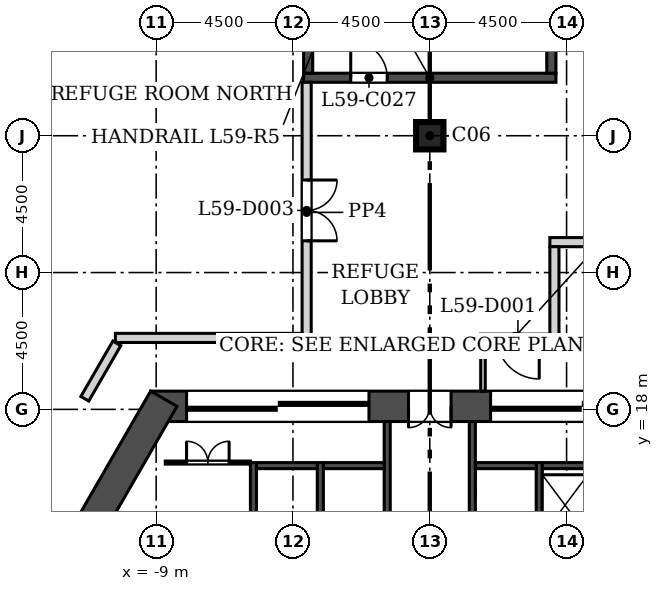
"""IFC4 building model, lengths in metres.
Left out: names, types, materials, properties, quantities, classifications, styles, units other than length and angle.
Written with IfcOpenShell. Run it as: python <this file> out.ifc"""

import sys

from ifc_helpers import new_model, si_unit, direction, frame, frame_2d, origin, origin_2d, place, context, subcontext, project, spatial, rectangle, extrude, element, fill, save


model = new_model("IFC4")
c1 = context("Model", 3, precision=1e-05, world=origin(), true_north=direction((0.0, 1.0)))
c2 = subcontext(c1, "Body", "Model", "MODEL_VIEW")
j1 = project(units=[si_unit("LENGTHUNIT", "METRE"), si_unit("PLANEANGLEUNIT", "RADIAN")], contexts=[c1])
p1 = place(None, origin())
s1 = spatial("IfcSite", under=j1, at=p1, CompositionType="ELEMENT")
p2 = place(p1, origin())
s2 = spatial("IfcBuilding", under=s1, at=p2, CompositionType="ELEMENT")
p3 = place(p2, frame((0.0, 0.0, 259.5)))
s3 = spatial("IfcBuildingStorey", under=s2, at=p3, CompositionType="ELEMENT", Elevation=259.5)
p4 = place(p3, frame((0.0, 27.0, 0.0), z_axis=(0.0, 0.0, 1.0), x_axis=(1.0, 0.0, 0.0)))
e1 = element("IfcColumn", 1, at=p4, inside=s3, PredefinedType="COLUMN", context=c2, shape_type="SweptSolid", body=[
    extrude(rectangle(XDim=0.9, YDim=0.9, at=origin_2d()), origin(), (0.0, 0.0, 1.0), 7.2),
])
p5 = place(p3, frame((9.181, 18.1, 0.0), z_axis=(0.0, 0.0, 1.0), x_axis=(-1.0, 0.0, 0.0)))
e2 = element("IfcWall", 2, at=p5, inside=s3, PredefinedType="SHEAR", context=c2, shape_type="SweptSolid", body=[
    extrude(rectangle(XDim=18.361, YDim=1.0, at=frame_2d((9.181, 0.0))), origin(), (0.0, 0.0, 1.0), 7.2),
])
p6 = place(p5, frame((8.481, 0.0, 0.0)))
e3 = element("IfcOpeningElement", 3, at=p6, cuts=e2, PredefinedType="OPENING", context=c2, shape_type="SweptSolid", body=[
    extrude(rectangle(XDim=1.4, YDim=2.1, at=frame_2d((0.7, 1.05))), frame((0.0, 0.51, 0.0), z_axis=(0.0, -1.0, 0.0), x_axis=(1.0, 0.0, 0.0)), (0.0, 0.0, 1.0), 1.02),
])
p7 = place(p5, frame((11.181, 0.0, 0.0)))
e4 = element("IfcOpeningElement", 4, at=p7, cuts=e2, PredefinedType="OPENING", context=c2, shape_type="SweptSolid", body=[
    extrude(rectangle(XDim=6.0, YDim=2.4, at=frame_2d((3.0, 1.2))), frame((0.0, 0.51, 0.0), z_axis=(0.0, -1.0, 0.0), x_axis=(1.0, 0.0, 0.0)), (0.0, 0.0, 1.0), 1.02),
])
p8 = place(p5, frame((1.181, 0.0, 0.0)))
e5 = element("IfcOpeningElement", 5, at=p8, cuts=e2, PredefinedType="OPENING", context=c2, shape_type="SweptSolid", body=[
    extrude(rectangle(XDim=6.0, YDim=2.4, at=frame_2d((3.0, 1.2))), frame((0.0, 0.51, 0.0), z_axis=(0.0, -1.0, 0.0), x_axis=(1.0, 0.0, 0.0)), (0.0, 0.0, 1.0), 1.02),
])
p9 = place(p3, frame((-8.748, 18.35, 0.0), z_axis=(0.0, 0.0, 1.0), x_axis=(-0.499995021168, -0.866028278295, 0.0)))
e6 = element("IfcWall", 6, at=p9, inside=s3, PredefinedType="SHEAR", context=c2, shape_type="SweptSolid", body=[
    extrude(rectangle(XDim=8.839, YDim=1.0, at=frame_2d((4.419, 0.0))), origin(), (0.0, 0.0, 1.0), 7.2),
])
p10 = place(p3, frame((26.022, 7.709, 0.0), z_axis=(0.0, 0.0, 1.0), x_axis=(-0.500000891752, 0.866024888931, 0.0)))
e7 = element("IfcWall", 7, at=p10, inside=s3, PredefinedType="SOLIDWALL", context=c2, shape_type="SweptSolid", body=[
    extrude(rectangle(XDim=43.339, YDim=0.34, at=frame_2d((21.669, 0.0))), origin(), (0.0, 0.0, 1.0), 6.8),
])
p11 = place(p10, frame((19.335, 0.0, 0.9)))
e8 = element("IfcOpeningElement", 8, at=p11, cuts=e7, PredefinedType="OPENING", context=c2, shape_type="SweptSolid", body=[
    extrude(rectangle(XDim=1.885, YDim=3.0, at=frame_2d((0.942, 1.5))), frame((0.0, 0.18, 0.0), z_axis=(0.0, -1.0, 0.0), x_axis=(1.0, 0.0, 0.0)), (0.0, 0.0, 1.0), 0.36),
])
p12 = place(p10, frame((34.335, 0.0, 0.9)))
e9 = element("IfcOpeningElement", 9, at=p12, cuts=e7, PredefinedType="OPENING", context=c2, shape_type="SweptSolid", body=[
    extrude(rectangle(XDim=1.885, YDim=3.0, at=frame_2d((0.942, 1.5))), frame((0.0, 0.18, 0.0), z_axis=(0.0, -1.0, 0.0), x_axis=(1.0, 0.0, 0.0)), (0.0, 0.0, 1.0), 0.36),
])
p13 = place(p10, frame((40.335, 0.0, 0.9)))
e10 = element("IfcOpeningElement", 10, at=p13, cuts=e7, PredefinedType="OPENING", context=c2, shape_type="SweptSolid", body=[
    extrude(rectangle(XDim=1.885, YDim=3.0, at=frame_2d((0.942, 1.5))), frame((0.0, 0.18, 0.0), z_axis=(0.0, -1.0, 0.0), x_axis=(1.0, 0.0, 0.0)), (0.0, 0.0, 1.0), 0.36),
])
p14 = place(p3, frame((-4.353, 45.242, 0.0), z_axis=(0.0, 0.0, 1.0), x_axis=(-0.500000891752, -0.866024888931, 0.0)))
e11 = element("IfcWall", 11, at=p14, inside=s3, PredefinedType="SOLIDWALL", context=c2, shape_type="SweptSolid", body=[
    extrude(rectangle(XDim=43.339, YDim=0.34, at=frame_2d((21.669, 0.0))), origin(), (0.0, 0.0, 1.0), 6.8),
])
p15 = place(p3, frame((-5.8, 8.25, -0.4), z_axis=(0.0, 0.0, 1.0), x_axis=(0.0, 1.0, 0.0)))
e12 = element("IfcWall", 12, at=p15, inside=s3, PredefinedType="SOLIDWALL", context=c2, shape_type="SweptSolid", body=[
    extrude(rectangle(XDim=8.0, YDim=0.2, at=frame_2d((4.0, 0.0))), origin(), (0.0, 0.0, 1.0), 7.2),
])
p16 = place(p15, frame((0.9, 0.0, 0.4)))
e13 = element("IfcOpeningElement", 13, at=p16, cuts=e12, PredefinedType="OPENING", context=c2, shape_type="SweptSolid", body=[
    extrude(rectangle(XDim=1.0, YDim=2.1, at=frame_2d((0.5, 1.05))), frame((0.0, 0.11, 0.0), z_axis=(0.0, -1.0, 0.0), x_axis=(1.0, 0.0, 0.0)), (0.0, 0.0, 1.0), 0.22),
])
p17 = place(p15, frame((4.8, 0.0, 0.4)))
e14 = element("IfcOpeningElement", 14, at=p17, cuts=e12, PredefinedType="OPENING", context=c2, shape_type="SweptSolid", body=[
    extrude(rectangle(XDim=1.0, YDim=2.1, at=frame_2d((0.5, 1.05))), frame((0.0, 0.11, 0.0), z_axis=(0.0, -1.0, 0.0), x_axis=(1.0, 0.0, 0.0)), (0.0, 0.0, 1.0), 0.22),
])
for number, where, z_axis, x_axis in (
    (15, (-3.6, 8.45, -0.4), (0.0, 0.0, 1.0), (0.0, 1.0, 0.0)),
    (16, (3.6, 8.45, -0.4), (0.0, 0.0, 1.0), (0.0, 1.0, 0.0)),
):
    element("IfcWall", number, at=place(p3, frame(where, z_axis=z_axis, x_axis=x_axis)), inside=s3, PredefinedType="SOLIDWALL", context=c2, shape_type="SweptSolid", body=[
        extrude(rectangle(XDim=7.8, YDim=0.2, at=frame_2d((3.9, 0.0))), origin(), (0.0, 0.0, 1.0), 7.2),
    ])
p18 = place(p3, frame((-1.4, 5.85, -0.4), z_axis=(0.0, 0.0, 1.0), x_axis=(0.0, 1.0, 0.0)))
e17 = element("IfcWall", 17, at=p18, inside=s3, PredefinedType="SOLIDWALL", context=c2, shape_type="SweptSolid", body=[
    extrude(rectangle(XDim=11.75, YDim=0.2, at=frame_2d((5.875, 0.0))), origin(), (0.0, 0.0, 1.0), 7.2),
])
p19 = place(p18, frame((0.65, 0.0, 0.4)))
e18 = element("IfcOpeningElement", 18, at=p19, cuts=e17, PredefinedType="OPENING", context=c2, shape_type="SweptSolid", body=[
    extrude(rectangle(XDim=1.1, YDim=2.1, at=frame_2d((0.55, 1.05))), frame((0.0, 0.11, 0.0), z_axis=(0.0, -1.0, 0.0), x_axis=(1.0, 0.0, 0.0)), (0.0, 0.0, 1.0), 0.22),
])
p20 = place(p18, frame((3.3, 0.0, 0.4)))
e19 = element("IfcOpeningElement", 19, at=p20, cuts=e17, PredefinedType="OPENING", context=c2, shape_type="SweptSolid", body=[
    extrude(rectangle(XDim=1.0, YDim=2.1, at=frame_2d((0.5, 1.05))), frame((0.0, 0.11, 0.0), z_axis=(0.0, -1.0, 0.0), x_axis=(1.0, 0.0, 0.0)), (0.0, 0.0, 1.0), 0.22),
])
p21 = place(p18, frame((7.2, 0.0, 0.4)))
e20 = element("IfcOpeningElement", 20, at=p21, cuts=e17, PredefinedType="OPENING", context=c2, shape_type="SweptSolid", body=[
    extrude(rectangle(XDim=1.0, YDim=2.1, at=frame_2d((0.5, 1.05))), frame((0.0, 0.11, 0.0), z_axis=(0.0, -1.0, 0.0), x_axis=(1.0, 0.0, 0.0)), (0.0, 0.0, 1.0), 0.22),
])
p22 = place(p3, frame((1.4, 5.85, -0.4), z_axis=(0.0, 0.0, 1.0), x_axis=(0.0, 1.0, 0.0)))
e21 = element("IfcWall", 21, at=p22, inside=s3, PredefinedType="SOLIDWALL", context=c2, shape_type="SweptSolid", body=[
    extrude(rectangle(XDim=11.75, YDim=0.2, at=frame_2d((5.875, 0.0))), origin(), (0.0, 0.0, 1.0), 7.2),
])
p23 = place(p22, frame((3.2, 0.0, 0.4)))
e22 = element("IfcOpeningElement", 22, at=p23, cuts=e21, PredefinedType="OPENING", context=c2, shape_type="SweptSolid", body=[
    extrude(rectangle(XDim=1.2, YDim=2.1, at=frame_2d((0.6, 1.05))), frame((0.0, 0.11, 0.0), z_axis=(0.0, -1.0, 0.0), x_axis=(1.0, 0.0, 0.0)), (0.0, 0.0, 1.0), 0.22),
])
p24 = place(p22, frame((0.65, 0.0, 0.4)))
e23 = element("IfcOpeningElement", 23, at=p24, cuts=e21, PredefinedType="OPENING", context=c2, shape_type="SweptSolid", body=[
    extrude(rectangle(XDim=1.1, YDim=2.1, at=frame_2d((0.55, 1.05))), frame((0.0, 0.11, 0.0), z_axis=(0.0, -1.0, 0.0), x_axis=(1.0, 0.0, 0.0)), (0.0, 0.0, 1.0), 0.22),
])
p25 = place(p22, frame((5.9, 0.0, 0.4)))
e24 = element("IfcOpeningElement", 24, at=p25, cuts=e21, PredefinedType="OPENING", context=c2, shape_type="SweptSolid", body=[
    extrude(rectangle(XDim=1.0, YDim=2.1, at=frame_2d((0.5, 1.05))), frame((0.0, 0.11, 0.0), z_axis=(0.0, -1.0, 0.0), x_axis=(1.0, 0.0, 0.0)), (0.0, 0.0, 1.0), 0.22),
])
for number, where, z_axis, x_axis in (
    (25, (-5.7, 16.15, -0.4), (0.0, 0.0, 1.0), (1.0, 0.0, 0.0)),
    (26, (-3.5, 16.15, -0.4), (0.0, 0.0, 1.0), (1.0, 0.0, 0.0)),
    (27, (3.7, 16.15, -0.4), (0.0, 0.0, 1.0), (1.0, 0.0, 0.0)),
    (28, (1.5, 16.15, -0.4), (0.0, 0.0, 1.0), (1.0, 0.0, 0.0)),
):
    element("IfcWall", number, at=place(p3, frame(where, z_axis=z_axis, x_axis=x_axis)), inside=s3, PredefinedType="SOLIDWALL", context=c2, shape_type="SweptSolid", body=[
        extrude(rectangle(XDim=2.0, YDim=0.2, at=frame_2d((1.0, 0.0))), origin(), (0.0, 0.0, 1.0), 7.2),
    ])
p26 = place(p3, frame((-8.7, 16.25, 0.0), z_axis=(0.0, 0.0, 1.0), x_axis=(1.0, 0.0, 0.0)))
e29 = element("IfcWall", 29, at=p26, inside=s3, PredefinedType="PARTITIONING", context=c2, shape_type="SweptSolid", body=[
    extrude(rectangle(XDim=2.8, YDim=0.1, at=frame_2d((1.4, 0.0))), origin(), (0.0, 0.0, 1.0), 6.8),
])
p27 = place(p26, frame((0.7, 0.0, 0.0)))
e30 = element("IfcOpeningElement", 30, at=p27, cuts=e29, PredefinedType="OPENING", context=c2, shape_type="SweptSolid", body=[
    extrude(rectangle(XDim=1.4, YDim=2.1, at=frame_2d((0.7, 1.05))), frame((0.0, 0.06, 0.0), z_axis=(0.0, -1.0, 0.0), x_axis=(1.0, 0.0, 0.0)), (0.0, 0.0, 1.0), 0.12),
])
p28 = place(p3, frame((-4.15, 28.907, -0.4), z_axis=(0.0, 0.0, 1.0), x_axis=(1.0, 0.0, 0.0)))
e31 = element("IfcWall", 31, at=p28, inside=s3, PredefinedType="SOLIDWALL", context=c2, shape_type="SweptSolid", body=[
    extrude(rectangle(XDim=8.3, YDim=0.3, at=frame_2d((4.15, 0.0))), origin(), (0.0, 0.0, 1.0), 7.2),
])
p29 = place(p28, frame((1.55, 0.0, 0.4)))
e32 = element("IfcOpeningElement", 32, at=p29, cuts=e31, PredefinedType="OPENING", context=c2, shape_type="SweptSolid", body=[
    extrude(rectangle(XDim=1.2, YDim=2.1, at=frame_2d((0.6, 1.05))), frame((0.0, 0.16, 0.0), z_axis=(0.0, -1.0, 0.0), x_axis=(1.0, 0.0, 0.0)), (0.0, 0.0, 1.0), 0.32),
])
p30 = place(p3, frame((-4.0, 29.057, -0.4), z_axis=(0.0, 0.0, 1.0), x_axis=(0.0, 1.0, 0.0)))
e33 = element("IfcWall", 33, at=p30, inside=s3, PredefinedType="SOLIDWALL", context=c2, shape_type="SweptSolid", body=[
    extrude(rectangle(XDim=6.5, YDim=0.3, at=frame_2d((3.25, 0.0))), origin(), (0.0, 0.0, 1.0), 7.2),
])
p31 = place(p30, frame((5.05, 0.0, 0.4)))
e34 = element("IfcOpeningElement", 34, at=p31, cuts=e33, PredefinedType="OPENING", context=c2, shape_type="SweptSolid", body=[
    extrude(rectangle(XDim=1.2, YDim=2.1, at=frame_2d((0.6, 1.05))), frame((0.0, 0.16, 0.0), z_axis=(0.0, -1.0, 0.0), x_axis=(1.0, 0.0, 0.0)), (0.0, 0.0, 1.0), 0.32),
])
p32 = place(p3, frame((4.0, 29.057, -0.4), z_axis=(0.0, 0.0, 1.0), x_axis=(0.0, 1.0, 0.0)))
e35 = element("IfcWall", 35, at=p32, inside=s3, PredefinedType="SOLIDWALL", context=c2, shape_type="SweptSolid", body=[
    extrude(rectangle(XDim=6.5, YDim=0.3, at=frame_2d((3.25, 0.0))), origin(), (0.0, 0.0, 1.0), 7.2),
])
p33 = place(p3, frame((-4.05, 20.2, 0.0), z_axis=(0.0, 0.0, 1.0), x_axis=(0.0, 1.0, 0.0)))
e36 = element("IfcWall", 36, at=p33, inside=s3, PredefinedType="SOLIDWALL", context=c2, shape_type="SweptSolid", body=[
    extrude(rectangle(XDim=8.557, YDim=0.3, at=frame_2d((4.279, 0.0))), origin(), (0.0, 0.0, 1.0), 6.8),
])
p34 = place(p33, frame((3.344, 0.0, 0.0)))
e37 = element("IfcOpeningElement", 37, at=p34, cuts=e36, PredefinedType="OPENING", context=c2, shape_type="SweptSolid", body=[
    extrude(rectangle(XDim=2.0, YDim=2.1, at=frame_2d((1.0, 1.05))), frame((0.0, 0.16, 0.0), z_axis=(0.0, -1.0, 0.0), x_axis=(1.0, 0.0, 0.0)), (0.0, 0.0, 1.0), 0.32),
])
p35 = place(p3, frame((3.95, 23.5, 0.0), z_axis=(0.0, 0.0, 1.0), x_axis=(1.0, 0.0, 0.0)))
e38 = element("IfcWall", 38, at=p35, inside=s3, PredefinedType="SOLIDWALL", context=c2, shape_type="SweptSolid", body=[
    extrude(rectangle(XDim=6.2, YDim=0.3, at=frame_2d((3.1, 0.0))), origin(), (0.0, 0.0, 1.0), 6.8),
])
p36 = place(p3, frame((-10.341, 20.35, 0.0), z_axis=(0.0, 0.0, 1.0), x_axis=(1.0, 0.0, 0.0)))
e39 = element("IfcWall", 39, at=p36, inside=s3, PredefinedType="SOLIDWALL", context=c2, shape_type="SweptSolid", body=[
    extrude(rectangle(XDim=6.141, YDim=0.3, at=frame_2d((3.071, 0.0))), origin(), (0.0, 0.0, 1.0), 6.8),
])
p37 = place(p3, frame((4.1, 20.2, 0.0), z_axis=(0.0, 0.0, 1.0), x_axis=(7.7513371e-05, 0.999999996996, 0.0)))
e40 = element("IfcWall", 40, at=p37, inside=s3, PredefinedType="SOLIDWALL", context=c2, shape_type="SweptSolid", body=[
    extrude(rectangle(XDim=3.15, YDim=0.3, at=frame_2d((1.575, 0.0))), origin(), (0.0, 0.0, 1.0), 6.8),
])
p38 = place(p3, frame((1.675, 20.4, 0.0), z_axis=(0.0, 0.0, 1.0), x_axis=(1.0, 0.0, 0.0)))
e41 = element("IfcWall", 41, at=p38, inside=s3, PredefinedType="PARTITIONING", context=c2, shape_type="SweptSolid", body=[
    extrude(rectangle(XDim=2.275, YDim=0.15, at=frame_2d((1.137, 0.0))), origin(), (0.0, 0.0, 1.0), 6.8),
])
p39 = place(p38, frame((0.524, 0.0, 0.0)))
e42 = element("IfcOpeningElement", 42, at=p39, cuts=e41, PredefinedType="OPENING", context=c2, shape_type="SweptSolid", body=[
    extrude(rectangle(XDim=1.4, YDim=2.1, at=frame_2d((0.7, 1.05))), frame((0.0, 0.085, 0.0), z_axis=(0.0, -1.0, 0.0), x_axis=(1.0, 0.0, 0.0)), (0.0, 0.0, 1.0), 0.17),
])
p40 = place(p3, frame((-11.347, 18.348, 0.0), z_axis=(0.0, 0.0, 1.0), x_axis=(0.500026652407, 0.866010015463, 0.0)))
e43 = element("IfcWall", 43, at=p40, inside=s3, PredefinedType="SOLIDWALL", context=c2, shape_type="SweptSolid", body=[
    extrude(rectangle(XDim=2.107, YDim=0.3, at=frame_2d((1.054, 0.0))), origin(), (0.0, 0.0, 1.0), 6.8),
])
p41 = place(p3, frame((1.75, 18.6, 0.0), z_axis=(0.0, 0.0, 1.0), x_axis=(0.0, 1.0, 0.0)))
e44 = element("IfcWall", 44, at=p41, inside=s3, PredefinedType="PARTITIONING", context=c2, shape_type="SweptSolid", body=[
    extrude(rectangle(XDim=1.725, YDim=0.15, at=frame_2d((0.862, 0.0))), origin(), (0.0, 0.0, 1.0), 6.8),
])
p42 = place(p27, origin())
e45 = element("IfcDoor", 45, at=p42, inside=s3, OperationType="DOUBLE_DOOR_SINGLE_SWING", PredefinedType="DOOR", context=c2, shape_type="SweptSolid", body=[
    extrude(rectangle(XDim=1.4, YDim=2.1, at=frame_2d((0.7, 1.05))), frame((0.0, 0.025, 0.0), z_axis=(0.0, -1.0, 0.0), x_axis=(1.0, 0.0, 0.0)), (0.0, 0.0, 1.0), 0.05),
])
fill(e30, e45)
p43 = place(p6, origin())
e46 = element("IfcDoor", 46, at=p43, inside=s3, OperationType="DOUBLE_DOOR_SINGLE_SWING", PredefinedType="DOOR", context=c2, shape_type="SweptSolid", body=[
    extrude(rectangle(XDim=1.4, YDim=2.1, at=frame_2d((0.7, 1.05))), frame((0.0, 0.025, 0.0), z_axis=(0.0, -1.0, 0.0), x_axis=(1.0, 0.0, 0.0)), (0.0, 0.0, 1.0), 0.05),
])
fill(e3, e46)
p44 = place(p7, origin())
e47 = element("IfcDoor", 47, at=p44, inside=s3, OperationType="DOUBLE_DOOR_SLIDING", PredefinedType="DOOR", context=c2, shape_type="SweptSolid", body=[
    extrude(rectangle(XDim=6.0, YDim=2.4, at=frame_2d((3.0, 1.2))), frame((0.0, 0.025, 0.0), z_axis=(0.0, -1.0, 0.0), x_axis=(1.0, 0.0, 0.0)), (0.0, 0.0, 1.0), 0.05),
])
fill(e4, e47)
p45 = place(p8, origin())
e48 = element("IfcDoor", 48, at=p45, inside=s3, OperationType="DOUBLE_DOOR_SLIDING", PredefinedType="DOOR", context=c2, shape_type="SweptSolid", body=[
    extrude(rectangle(XDim=6.0, YDim=2.4, at=frame_2d((3.0, 1.2))), frame((0.0, 0.025, 0.0), z_axis=(0.0, -1.0, 0.0), x_axis=(1.0, 0.0, 0.0)), (0.0, 0.0, 1.0), 0.05),
])
fill(e5, e48)
p46 = place(p29, origin())
e49 = element("IfcDoor", 49, at=p46, inside=s3, OperationType="SINGLE_SWING_LEFT", PredefinedType="DOOR", context=c2, shape_type="SweptSolid", body=[
    extrude(rectangle(XDim=1.2, YDim=2.1, at=frame_2d((0.6, 1.05))), frame((0.0, 0.025, 0.0), z_axis=(0.0, -1.0, 0.0), x_axis=(1.0, 0.0, 0.0)), (0.0, 0.0, 1.0), 0.05),
])
fill(e32, e49)
p47 = place(p39, frame((1.4, 0.0, 0.0), z_axis=(0.0, 0.0, 1.0), x_axis=(-1.0, 0.0, 0.0)))
e50 = element("IfcDoor", 50, at=p47, inside=s3, OperationType="SINGLE_SWING_LEFT", PredefinedType="DOOR", context=c2, shape_type="SweptSolid", body=[
    extrude(rectangle(XDim=1.4, YDim=2.1, at=frame_2d((0.7, 1.05))), frame((0.0, 0.025, 0.0), z_axis=(0.0, -1.0, 0.0), x_axis=(1.0, 0.0, 0.0)), (0.0, 0.0, 1.0), 0.05),
])
fill(e42, e50)
p48 = place(p34, frame((2.0, 0.0, 0.0), z_axis=(0.0, 0.0, 1.0), x_axis=(-1.0, 0.0, 0.0)))
e51 = element("IfcDoor", 51, at=p48, inside=s3, OperationType="DOUBLE_DOOR_SINGLE_SWING", PredefinedType="DOOR", context=c2, shape_type="SweptSolid", body=[
    extrude(rectangle(XDim=2.0, YDim=2.1, at=frame_2d((1.0, 1.05))), frame((0.0, 0.025, 0.0), z_axis=(0.0, -1.0, 0.0), x_axis=(1.0, 0.0, 0.0)), (0.0, 0.0, 1.0), 0.05),
])
fill(e37, e51)
save(model, sys.argv[1])
